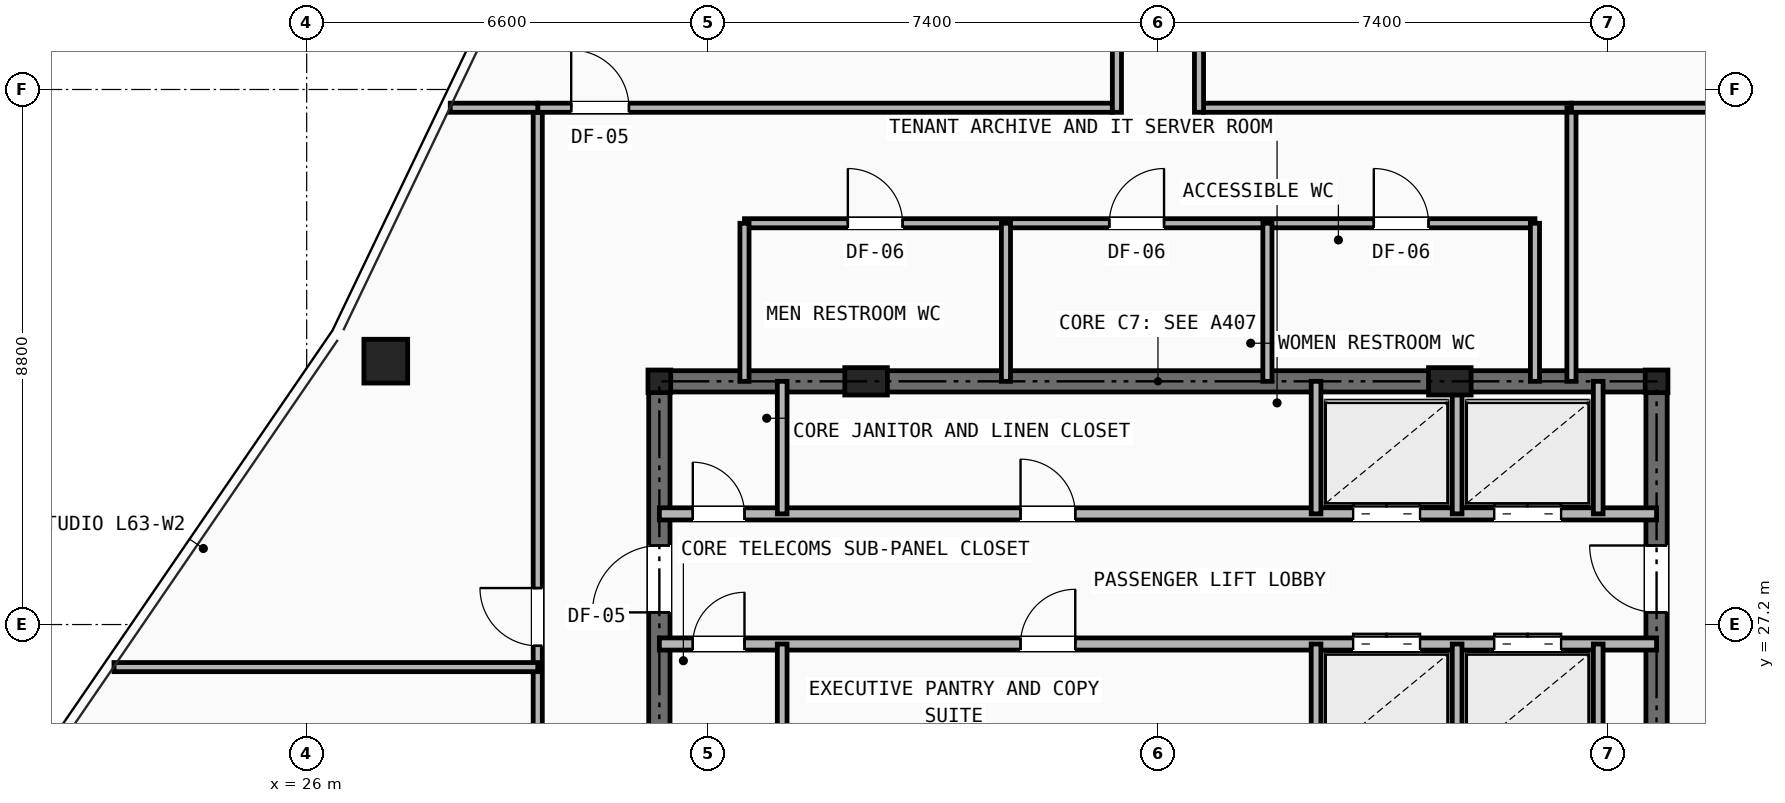
"""IFC4 building model, lengths in metres.
Left out: names, types, materials, properties, quantities, classifications, styles, units other than length and angle.
Written with IfcOpenShell. Run it as: python <this file> out.ifc"""

import sys

from ifc_helpers import new_model, si_unit, direction, frame, frame_2d, origin, origin_2d, place, context, subcontext, project, spatial, rectangle, hollow_rectangle, i_section, extrude, element, fill, save


model = new_model("IFC4")
c1 = context("Model", 3, precision=1e-05, world=origin(), true_north=direction((0.0, 1.0)))
c2 = subcontext(c1, "Body", "Model", "MODEL_VIEW")
j1 = project(units=[si_unit("LENGTHUNIT", "METRE"), si_unit("PLANEANGLEUNIT", "RADIAN")], contexts=[c1])
p1 = place(None, origin())
s1 = spatial("IfcSite", under=j1, at=p1, CompositionType="ELEMENT")
p2 = place(p1, origin())
s2 = spatial("IfcBuilding", under=s1, at=p2, CompositionType="ELEMENT")
p3 = place(p2, frame((0.0, 0.0, 222.4)))
s3 = spatial("IfcBuildingStorey", under=s2, at=p3, CompositionType="ELEMENT", Elevation=222.4)
for number, where, z_axis, x_axis in (
    (1, (31.8, 31.2, 0.0), (0.0, 0.0, 1.0), (1.0, 0.0, 0.0)),
    (2, (48.2, 31.2, 0.0), (0.0, 0.0, 1.0), (1.0, 0.0, 0.0)),
):
    element("IfcColumn", number, at=place(p3, frame(where, z_axis=z_axis, x_axis=x_axis)), inside=s3, PredefinedType="COLUMN", context=c2, shape_type="SweptSolid", body=[
        extrude(i_section(OverallWidth=0.374, OverallDepth=0.372, WebThickness=0.016, FlangeThickness=0.026, at=origin_2d()), origin(), (0.0, 0.0, 1.0), 3.5),
    ])
for number, where, z_axis, x_axis in (
    (3, (35.2, 31.2, 0.0), (0.0, 0.0, 1.0), (1.0, 0.0, 0.0)),
    (4, (44.8, 31.2, 0.0), (0.0, 0.0, 1.0), (1.0, 0.0, 0.0)),
):
    element("IfcColumn", number, at=place(p3, frame(where, z_axis=z_axis, x_axis=x_axis)), inside=s3, PredefinedType="PILASTER", context=c2, shape_type="SweptSolid", body=[
        extrude(rectangle(XDim=0.7, YDim=0.45, at=origin_2d()), origin(), (0.0, 0.0, 1.0), 3.5),
    ])
p4 = place(p3, frame((27.301, 31.532, 0.0), z_axis=(0.0, 0.0, 1.0), x_axis=(1.0, 0.0, 0.0)))
e5 = element("IfcColumn", 5, at=p4, inside=s3, PredefinedType="COLUMN", context=c2, shape_type="SweptSolid", body=[
    extrude(hollow_rectangle(XDim=0.72, YDim=0.72, WallThickness=0.05, at=origin_2d()), origin(), (0.0, 0.0, 1.0), 3.5),
])
p5 = place(p3, frame((31.8, 31.2, 0.0), z_axis=(0.0, 0.0, 1.0), x_axis=(1.0, 0.0, 0.0)))
e6 = element("IfcWall", 6, at=p5, inside=s3, PredefinedType="SHEAR", context=c2, shape_type="SweptSolid", body=[
    extrude(rectangle(XDim=16.4, YDim=0.35, at=frame_2d((8.2, 0.0))), origin(), (0.0, 0.0, 1.0), 3.25),
])
p6 = place(p3, frame((31.8, 16.4, 0.0), z_axis=(0.0, 0.0, 1.0), x_axis=(0.0, 1.0, 0.0)))
e7 = element("IfcWall", 7, at=p6, inside=s3, PredefinedType="SHEAR", context=c2, shape_type="SweptSolid", body=[
    extrude(rectangle(XDim=14.8, YDim=0.35, at=frame_2d((7.4, 0.0))), origin(), (0.0, 0.0, 1.0), 3.25),
])
p7 = place(p6, frame((11.0, 0.0, 0.0)))
e8 = element("IfcOpeningElement", 8, at=p7, cuts=e7, PredefinedType="OPENING", context=c2, shape_type="SweptSolid", body=[
    extrude(rectangle(XDim=1.1, YDim=2.15, at=frame_2d((0.55, 1.075))), frame((0.0, 0.185, 0.0), z_axis=(0.0, -1.0, 0.0), x_axis=(1.0, 0.0, 0.0)), (0.0, 0.0, 1.0), 0.37),
])
p8 = place(p3, frame((48.2, 16.4, 0.0), z_axis=(0.0, 0.0, 1.0), x_axis=(0.0, 1.0, 0.0)))
e9 = element("IfcWall", 9, at=p8, inside=s3, PredefinedType="SHEAR", context=c2, shape_type="SweptSolid", body=[
    extrude(rectangle(XDim=14.8, YDim=0.35, at=frame_2d((7.4, 0.0))), origin(), (0.0, 0.0, 1.0), 3.25),
])
p9 = place(p8, frame((11.0, 0.0, 0.0)))
e10 = element("IfcOpeningElement", 10, at=p9, cuts=e9, PredefinedType="OPENING", context=c2, shape_type="SweptSolid", body=[
    extrude(rectangle(XDim=1.1, YDim=2.15, at=frame_2d((0.55, 1.075))), frame((0.0, 0.185, 0.0), z_axis=(0.0, -1.0, 0.0), x_axis=(1.0, 0.0, 0.0)), (0.0, 0.0, 1.0), 0.37),
])
p10 = place(p3, frame((31.8, 29.02, 0.0), z_axis=(0.0, 0.0, 1.0), x_axis=(1.0, 0.0, 0.0)))
e11 = element("IfcWall", 11, at=p10, inside=s3, PredefinedType="SOLIDWALL", context=c2, shape_type="SweptSolid", body=[
    extrude(rectangle(XDim=16.4, YDim=0.2, at=frame_2d((8.2, 0.0))), origin(), (0.0, 0.0, 1.0), 2.705),
])
p11 = place(p10, frame((0.55, 0.0, 0.0)))
e12 = element("IfcOpeningElement", 12, at=p11, cuts=e11, PredefinedType="OPENING", context=c2, shape_type="SweptSolid", body=[
    extrude(rectangle(XDim=0.85, YDim=2.05, at=frame_2d((0.425, 1.025))), frame((0.0, 0.11, 0.0), z_axis=(0.0, -1.0, 0.0), x_axis=(1.0, 0.0, 0.0)), (0.0, 0.0, 1.0), 0.22),
])
p12 = place(p10, frame((5.94, 0.0, 0.0)))
e13 = element("IfcOpeningElement", 13, at=p12, cuts=e11, PredefinedType="OPENING", context=c2, shape_type="SweptSolid", body=[
    extrude(rectangle(XDim=0.9, YDim=2.1, at=frame_2d((0.45, 1.05))), frame((0.0, 0.11, 0.0), z_axis=(0.0, -1.0, 0.0), x_axis=(1.0, 0.0, 0.0)), (0.0, 0.0, 1.0), 0.22),
])
p13 = place(p10, frame((11.41, 0.0, 0.0)))
e14 = element("IfcOpeningElement", 14, at=p13, cuts=e11, PredefinedType="OPENING", context=c2, shape_type="SweptSolid", body=[
    extrude(rectangle(XDim=1.1, YDim=2.15, at=frame_2d((0.55, 1.075))), frame((0.0, 0.11, 0.0), z_axis=(0.0, -1.0, 0.0), x_axis=(1.0, 0.0, 0.0)), (0.0, 0.0, 1.0), 0.22),
])
p14 = place(p10, frame((13.73, 0.0, 0.0)))
e15 = element("IfcOpeningElement", 15, at=p14, cuts=e11, PredefinedType="OPENING", context=c2, shape_type="SweptSolid", body=[
    extrude(rectangle(XDim=1.1, YDim=2.15, at=frame_2d((0.55, 1.075))), frame((0.0, 0.11, 0.0), z_axis=(0.0, -1.0, 0.0), x_axis=(1.0, 0.0, 0.0)), (0.0, 0.0, 1.0), 0.22),
])
p15 = place(p3, frame((31.8, 26.88, 0.0), z_axis=(0.0, 0.0, 1.0), x_axis=(1.0, 0.0, 0.0)))
e16 = element("IfcWall", 16, at=p15, inside=s3, PredefinedType="SOLIDWALL", context=c2, shape_type="SweptSolid", body=[
    extrude(rectangle(XDim=16.4, YDim=0.2, at=frame_2d((8.2, 0.0))), origin(), (0.0, 0.0, 1.0), 2.705),
])
p16 = place(p15, frame((0.55, 0.0, 0.0)))
e17 = element("IfcOpeningElement", 17, at=p16, cuts=e16, PredefinedType="OPENING", context=c2, shape_type="SweptSolid", body=[
    extrude(rectangle(XDim=0.85, YDim=2.05, at=frame_2d((0.425, 1.025))), frame((0.0, 0.11, 0.0), z_axis=(0.0, -1.0, 0.0), x_axis=(1.0, 0.0, 0.0)), (0.0, 0.0, 1.0), 0.22),
])
p17 = place(p15, frame((5.94, 0.0, 0.0)))
e18 = element("IfcOpeningElement", 18, at=p17, cuts=e16, PredefinedType="OPENING", context=c2, shape_type="SweptSolid", body=[
    extrude(rectangle(XDim=0.9, YDim=2.1, at=frame_2d((0.45, 1.05))), frame((0.0, 0.11, 0.0), z_axis=(0.0, -1.0, 0.0), x_axis=(1.0, 0.0, 0.0)), (0.0, 0.0, 1.0), 0.22),
])
p18 = place(p15, frame((11.41, 0.0, 0.0)))
e19 = element("IfcOpeningElement", 19, at=p18, cuts=e16, PredefinedType="OPENING", context=c2, shape_type="SweptSolid", body=[
    extrude(rectangle(XDim=1.1, YDim=2.15, at=frame_2d((0.55, 1.075))), frame((0.0, 0.11, 0.0), z_axis=(0.0, -1.0, 0.0), x_axis=(1.0, 0.0, 0.0)), (0.0, 0.0, 1.0), 0.22),
])
p19 = place(p15, frame((13.73, 0.0, 0.0)))
e20 = element("IfcOpeningElement", 20, at=p19, cuts=e16, PredefinedType="OPENING", context=c2, shape_type="SweptSolid", body=[
    extrude(rectangle(XDim=1.1, YDim=2.15, at=frame_2d((0.55, 1.075))), frame((0.0, 0.11, 0.0), z_axis=(0.0, -1.0, 0.0), x_axis=(1.0, 0.0, 0.0)), (0.0, 0.0, 1.0), 0.22),
])
p20 = place(p3, frame((33.82, 29.02, 0.0), z_axis=(0.0, 0.0, 1.0), x_axis=(0.0, 1.0, 0.0)))
e21 = element("IfcWall", 21, at=p20, inside=s3, PredefinedType="SOLIDWALL", context=c2, shape_type="SweptSolid", body=[
    extrude(rectangle(XDim=2.18, YDim=0.16, at=frame_2d((1.09, 0.0))), origin(), (0.0, 0.0, 1.0), 2.705),
])
p21 = place(p3, frame((33.82, 24.8, 0.0), z_axis=(0.0, 0.0, 1.0), x_axis=(0.0, 1.0, 0.0)))
e22 = element("IfcWall", 22, at=p21, inside=s3, PredefinedType="SOLIDWALL", context=c2, shape_type="SweptSolid", body=[
    extrude(rectangle(XDim=2.08, YDim=0.16, at=frame_2d((1.04, 0.0))), origin(), (0.0, 0.0, 1.0), 3.25),
])
for number, where, z_axis, x_axis in (
    (23, (42.6, 29.02, 0.0), (0.0, 0.0, 1.0), (0.0, 1.0, 0.0)),
    (24, (44.92, 29.02, 0.0), (0.0, 0.0, 1.0), (0.0, 1.0, 0.0)),
    (25, (47.24, 29.02, 0.0), (0.0, 0.0, 1.0), (0.0, 1.0, 0.0)),
):
    element("IfcWall", number, at=place(p3, frame(where, z_axis=z_axis, x_axis=x_axis)), inside=s3, PredefinedType="SOLIDWALL", context=c2, shape_type="SweptSolid", body=[
        extrude(rectangle(XDim=2.18, YDim=0.16, at=frame_2d((1.09, 0.0))), origin(), (0.0, 0.0, 1.0), 2.705),
    ])
for number, where, z_axis, x_axis in (
    (26, (42.6, 24.8, 0.0), (0.0, 0.0, 1.0), (0.0, 1.0, 0.0)),
    (27, (44.92, 24.8, 0.0), (0.0, 0.0, 1.0), (0.0, 1.0, 0.0)),
    (28, (47.24, 24.8, 0.0), (0.0, 0.0, 1.0), (0.0, 1.0, 0.0)),
):
    element("IfcWall", number, at=place(p3, frame(where, z_axis=z_axis, x_axis=x_axis)), inside=s3, PredefinedType="SOLIDWALL", context=c2, shape_type="SweptSolid", body=[
        extrude(rectangle(XDim=2.08, YDim=0.16, at=frame_2d((1.04, 0.0))), origin(), (0.0, 0.0, 1.0), 3.25),
    ])
p22 = place(p3, frame((33.2, 33.8, 0.0), z_axis=(0.0, 0.0, 1.0), x_axis=(1.0, 0.0, 0.0)))
e29 = element("IfcWall", 29, at=p22, inside=s3, PredefinedType="PARTITIONING", context=c2, shape_type="SweptSolid", body=[
    extrude(rectangle(XDim=13.0, YDim=0.15, at=frame_2d((6.5, 0.0))), origin(), (0.0, 0.0, 1.0), 3.25),
])
p23 = place(p22, frame((1.7, 0.0, 0.0)))
e30 = element("IfcOpeningElement", 30, at=p23, cuts=e29, PredefinedType="OPENING", context=c2, shape_type="SweptSolid", body=[
    extrude(rectangle(XDim=0.9, YDim=2.1, at=frame_2d((0.45, 1.05))), frame((0.0, 0.085, 0.0), z_axis=(0.0, -1.0, 0.0), x_axis=(1.0, 0.0, 0.0)), (0.0, 0.0, 1.0), 0.17),
])
p24 = place(p22, frame((6.0, 0.0, 0.0)))
e31 = element("IfcOpeningElement", 31, at=p24, cuts=e29, PredefinedType="OPENING", context=c2, shape_type="SweptSolid", body=[
    extrude(rectangle(XDim=0.9, YDim=2.1, at=frame_2d((0.45, 1.05))), frame((0.0, 0.085, 0.0), z_axis=(0.0, -1.0, 0.0), x_axis=(1.0, 0.0, 0.0)), (0.0, 0.0, 1.0), 0.17),
])
p25 = place(p22, frame((10.35, 0.0, 0.0)))
e32 = element("IfcOpeningElement", 32, at=p25, cuts=e29, PredefinedType="OPENING", context=c2, shape_type="SweptSolid", body=[
    extrude(rectangle(XDim=0.9, YDim=2.1, at=frame_2d((0.45, 1.05))), frame((0.0, 0.085, 0.0), z_axis=(0.0, -1.0, 0.0), x_axis=(1.0, 0.0, 0.0)), (0.0, 0.0, 1.0), 0.17),
])
for number, where, z_axis, x_axis in (
    (33, (33.2, 31.2, 0.0), (0.0, 0.0, 1.0), (0.0, 1.0, 0.0)),
    (34, (46.2, 31.2, 0.0), (0.0, 0.0, 1.0), (0.0, 1.0, 0.0)),
    (35, (37.5, 31.2, 0.0), (0.0, 0.0, 1.0), (0.0, 1.0, 0.0)),
    (36, (41.8, 31.2, 0.0), (0.0, 0.0, 1.0), (0.0, 1.0, 0.0)),
):
    element("IfcWall", number, at=place(p3, frame(where, z_axis=z_axis, x_axis=x_axis)), inside=s3, PredefinedType="PARTITIONING", context=c2, shape_type="SweptSolid", body=[
        extrude(rectangle(XDim=2.6, YDim=0.15, at=frame_2d((1.3, 0.0))), origin(), (0.0, 0.0, 1.0), 2.705),
    ])
p26 = place(p3, frame((29.8, 16.4, 0.0), z_axis=(0.0, 0.0, 1.0), x_axis=(0.0, 1.0, 0.0)))
e37 = element("IfcWall", 37, at=p26, inside=s3, PredefinedType="PARTITIONING", context=c2, shape_type="SweptSolid", body=[
    extrude(rectangle(XDim=19.3, YDim=0.15, at=frame_2d((9.65, 0.0))), origin(), (0.0, 0.0, 1.0), 2.265),
])
p27 = place(p26, frame((0.35, 0.0, 0.0)))
e38 = element("IfcOpeningElement", 38, at=p27, cuts=e37, PredefinedType="OPENING", context=c2, shape_type="SweptSolid", body=[
    extrude(rectangle(XDim=0.95, YDim=2.1, at=frame_2d((0.475, 1.05))), frame((0.0, 0.085, 0.0), z_axis=(0.0, -1.0, 0.0), x_axis=(1.0, 0.0, 0.0)), (0.0, 0.0, 1.0), 0.17),
])
p28 = place(p26, frame((10.45, 0.0, 0.0)))
e39 = element("IfcOpeningElement", 39, at=p28, cuts=e37, PredefinedType="OPENING", context=c2, shape_type="SweptSolid", body=[
    extrude(rectangle(XDim=0.95, YDim=2.1, at=frame_2d((0.475, 1.05))), frame((0.0, 0.085, 0.0), z_axis=(0.0, -1.0, 0.0), x_axis=(1.0, 0.0, 0.0)), (0.0, 0.0, 1.0), 0.17),
])
p29 = place(p3, frame((29.8, 35.7, 0.0), z_axis=(0.0, 0.0, 1.0), x_axis=(1.0, 0.0, 0.0)))
e40 = element("IfcWall", 40, at=p29, inside=s3, PredefinedType="PARTITIONING", context=c2, shape_type="SweptSolid", body=[
    extrude(rectangle(XDim=9.45, YDim=0.15, at=frame_2d((4.725, 0.0))), origin(), (0.0, 0.0, 1.0), 2.833),
])
p30 = place(p29, frame((0.55, 0.0, 0.0)))
e41 = element("IfcOpeningElement", 41, at=p30, cuts=e40, PredefinedType="OPENING", context=c2, shape_type="SweptSolid", body=[
    extrude(rectangle(XDim=0.95, YDim=2.1, at=frame_2d((0.475, 1.05))), frame((0.0, 0.085, 0.0), z_axis=(0.0, -1.0, 0.0), x_axis=(1.0, 0.0, 0.0)), (0.0, 0.0, 1.0), 0.17),
])
p31 = place(p3, frame((40.75, 35.7, 0.0), z_axis=(0.0, 0.0, 1.0), x_axis=(1.0, 0.0, 0.0)))
e42 = element("IfcWall", 42, at=p31, inside=s3, PredefinedType="PARTITIONING", context=c2, shape_type="SweptSolid", body=[
    extrude(rectangle(XDim=6.05, YDim=0.15, at=frame_2d((3.025, 0.0))), origin(), (0.0, 0.0, 1.0), 3.25),
])
p32 = place(p3, frame((46.8, 31.2, 0.0), z_axis=(0.0, 0.0, 1.0), x_axis=(0.0, 1.0, 0.0)))
e43 = element("IfcWall", 43, at=p32, inside=s3, PredefinedType="PARTITIONING", context=c2, shape_type="SweptSolid", body=[
    extrude(rectangle(XDim=4.5, YDim=0.15, at=frame_2d((2.25, 0.0))), origin(), (0.0, 0.0, 1.0), 2.705),
])
p33 = place(p3, frame((28.361, 35.7, 0.0), z_axis=(0.0, 0.0, 1.0), x_axis=(1.0, 0.0, 0.0)))
e44 = element("IfcWall", 44, at=p33, inside=s3, PredefinedType="PARTITIONING", context=c2, shape_type="SweptSolid", body=[
    extrude(rectangle(XDim=1.439, YDim=0.15, at=frame_2d((0.719, 0.0))), origin(), (0.0, 0.0, 1.0), 2.628),
])
p34 = place(p3, frame((22.831, 26.5, 0.0), z_axis=(0.0, 0.0, 1.0), x_axis=(1.0, 0.0, 0.0)))
e45 = element("IfcWall", 45, at=p34, inside=s3, PredefinedType="PARTITIONING", context=c2, shape_type="SweptSolid", body=[
    extrude(rectangle(XDim=6.969, YDim=0.15, at=frame_2d((3.484, 0.0))), origin(), (0.0, 0.0, 1.0), 2.628),
])
p35 = place(p3, frame((46.8, 35.7, 0.0), z_axis=(0.0, 0.0, 1.0), x_axis=(1.0, 0.0, 0.0)))
e46 = element("IfcWall", 46, at=p35, inside=s3, PredefinedType="PARTITIONING", context=c2, shape_type="SweptSolid", body=[
    extrude(rectangle(XDim=4.839, YDim=0.15, at=frame_2d((2.419, 0.0))), origin(), (0.0, 0.0, 1.0), 2.628),
])
for number, where, z_axis, x_axis in (
    (47, (39.325, 35.625, 0.0), (0.0, 0.0, 1.0), (0.0, 1.0, 0.0)),
    (48, (40.675, 35.625, 0.0), (0.0, 0.0, 1.0), (0.0, 1.0, 0.0)),
):
    element("IfcWall", number, at=place(p3, frame(where, z_axis=z_axis, x_axis=x_axis)), inside=s3, PredefinedType="PARTITIONING", context=c2, shape_type="SweptSolid", body=[
        extrude(rectangle(XDim=2.825, YDim=0.15, at=frame_2d((1.413, 0.0))), origin(), (0.0, 0.0, 1.0), 3.25),
    ])
p36 = place(p11, origin())
e49 = element("IfcDoor", 49, at=p36, inside=s3, OperationType="SINGLE_SWING_LEFT", PredefinedType="DOOR", context=c2, shape_type="SweptSolid", body=[
    extrude(rectangle(XDim=0.85, YDim=2.05, at=frame_2d((0.425, 1.025))), frame((0.0, 0.025, 0.0), z_axis=(0.0, -1.0, 0.0), x_axis=(1.0, 0.0, 0.0)), (0.0, 0.0, 1.0), 0.05),
])
fill(e12, e49)
p37 = place(p16, origin())
e50 = element("IfcDoor", 50, at=p37, inside=s3, OperationType="SINGLE_SWING_RIGHT", PredefinedType="DOOR", context=c2, shape_type="SweptSolid", body=[
    extrude(rectangle(XDim=0.85, YDim=2.05, at=frame_2d((0.425, 1.025))), frame((0.0, 0.025, 0.0), z_axis=(0.0, -1.0, 0.0), x_axis=(1.0, 0.0, 0.0)), (0.0, 0.0, 1.0), 0.05),
])
fill(e17, e50)
p38 = place(p7, origin())
e51 = element("IfcDoor", 51, at=p38, inside=s3, OperationType="SINGLE_SWING_LEFT", PredefinedType="DOOR", context=c2, shape_type="SweptSolid", body=[
    extrude(rectangle(XDim=1.1, YDim=2.15, at=frame_2d((0.55, 1.075))), frame((0.0, 0.025, 0.0), z_axis=(0.0, -1.0, 0.0), x_axis=(1.0, 0.0, 0.0)), (0.0, 0.0, 1.0), 0.05),
])
fill(e8, e51)
p39 = place(p9, origin())
e52 = element("IfcDoor", 52, at=p39, inside=s3, OperationType="SINGLE_SWING_RIGHT", PredefinedType="DOOR", context=c2, shape_type="SweptSolid", body=[
    extrude(rectangle(XDim=1.1, YDim=2.15, at=frame_2d((0.55, 1.075))), frame((0.0, 0.025, 0.0), z_axis=(0.0, -1.0, 0.0), x_axis=(1.0, 0.0, 0.0)), (0.0, 0.0, 1.0), 0.05),
])
fill(e10, e52)
p40 = place(p12, origin())
e53 = element("IfcDoor", 53, at=p40, inside=s3, OperationType="SINGLE_SWING_LEFT", PredefinedType="DOOR", context=c2, shape_type="SweptSolid", body=[
    extrude(rectangle(XDim=0.9, YDim=2.1, at=frame_2d((0.45, 1.05))), frame((0.0, 0.025, 0.0), z_axis=(0.0, -1.0, 0.0), x_axis=(1.0, 0.0, 0.0)), (0.0, 0.0, 1.0), 0.05),
])
fill(e13, e53)
p41 = place(p17, origin())
e54 = element("IfcDoor", 54, at=p41, inside=s3, OperationType="SINGLE_SWING_RIGHT", PredefinedType="DOOR", context=c2, shape_type="SweptSolid", body=[
    extrude(rectangle(XDim=0.9, YDim=2.1, at=frame_2d((0.45, 1.05))), frame((0.0, 0.025, 0.0), z_axis=(0.0, -1.0, 0.0), x_axis=(1.0, 0.0, 0.0)), (0.0, 0.0, 1.0), 0.05),
])
fill(e18, e54)
p42 = place(p13, origin())
e55 = element("IfcDoor", 55, at=p42, inside=s3, OperationType="DOUBLE_DOOR_SLIDING", PredefinedType="DOOR", context=c2, shape_type="SweptSolid", body=[
    extrude(rectangle(XDim=1.1, YDim=2.15, at=frame_2d((0.55, 1.075))), frame((0.0, 0.025, 0.0), z_axis=(0.0, -1.0, 0.0), x_axis=(1.0, 0.0, 0.0)), (0.0, 0.0, 1.0), 0.05),
])
fill(e14, e55)
p43 = place(p14, origin())
e56 = element("IfcDoor", 56, at=p43, inside=s3, OperationType="DOUBLE_DOOR_SLIDING", PredefinedType="DOOR", context=c2, shape_type="SweptSolid", body=[
    extrude(rectangle(XDim=1.1, YDim=2.15, at=frame_2d((0.55, 1.075))), frame((0.0, 0.025, 0.0), z_axis=(0.0, -1.0, 0.0), x_axis=(1.0, 0.0, 0.0)), (0.0, 0.0, 1.0), 0.05),
])
fill(e15, e56)
p44 = place(p18, origin())
e57 = element("IfcDoor", 57, at=p44, inside=s3, OperationType="DOUBLE_DOOR_SLIDING", PredefinedType="DOOR", context=c2, shape_type="SweptSolid", body=[
    extrude(rectangle(XDim=1.1, YDim=2.15, at=frame_2d((0.55, 1.075))), frame((0.0, 0.025, 0.0), z_axis=(0.0, -1.0, 0.0), x_axis=(1.0, 0.0, 0.0)), (0.0, 0.0, 1.0), 0.05),
])
fill(e19, e57)
p45 = place(p19, origin())
e58 = element("IfcDoor", 58, at=p45, inside=s3, OperationType="DOUBLE_DOOR_SLIDING", PredefinedType="DOOR", context=c2, shape_type="SweptSolid", body=[
    extrude(rectangle(XDim=1.1, YDim=2.15, at=frame_2d((0.55, 1.075))), frame((0.0, 0.025, 0.0), z_axis=(0.0, -1.0, 0.0), x_axis=(1.0, 0.0, 0.0)), (0.0, 0.0, 1.0), 0.05),
])
fill(e20, e58)
p46 = place(p23, origin())
e59 = element("IfcDoor", 59, at=p46, inside=s3, OperationType="SINGLE_SWING_LEFT", PredefinedType="DOOR", context=c2, shape_type="SweptSolid", body=[
    extrude(rectangle(XDim=0.9, YDim=2.1, at=frame_2d((0.45, 1.05))), frame((0.0, 0.025, 0.0), z_axis=(0.0, -1.0, 0.0), x_axis=(1.0, 0.0, 0.0)), (0.0, 0.0, 1.0), 0.05),
])
fill(e30, e59)
p47 = place(p24, origin())
e60 = element("IfcDoor", 60, at=p47, inside=s3, OperationType="SINGLE_SWING_RIGHT", PredefinedType="DOOR", context=c2, shape_type="SweptSolid", body=[
    extrude(rectangle(XDim=0.9, YDim=2.1, at=frame_2d((0.45, 1.05))), frame((0.0, 0.025, 0.0), z_axis=(0.0, -1.0, 0.0), x_axis=(1.0, 0.0, 0.0)), (0.0, 0.0, 1.0), 0.05),
])
fill(e31, e60)
p48 = place(p25, origin())
e61 = element("IfcDoor", 61, at=p48, inside=s3, OperationType="SINGLE_SWING_LEFT", PredefinedType="DOOR", context=c2, shape_type="SweptSolid", body=[
    extrude(rectangle(XDim=0.9, YDim=2.1, at=frame_2d((0.45, 1.05))), frame((0.0, 0.025, 0.0), z_axis=(0.0, -1.0, 0.0), x_axis=(1.0, 0.0, 0.0)), (0.0, 0.0, 1.0), 0.05),
])
fill(e32, e61)
p49 = place(p28, origin())
e62 = element("IfcDoor", 62, at=p49, inside=s3, OperationType="SINGLE_SWING_RIGHT", PredefinedType="DOOR", context=c2, shape_type="SweptSolid", body=[
    extrude(rectangle(XDim=0.95, YDim=2.1, at=frame_2d((0.475, 1.05))), frame((0.0, 0.025, 0.0), z_axis=(0.0, -1.0, 0.0), x_axis=(1.0, 0.0, 0.0)), (0.0, 0.0, 1.0), 0.05),
])
fill(e39, e62)
p50 = place(p30, origin())
e63 = element("IfcDoor", 63, at=p50, inside=s3, OperationType="SINGLE_SWING_LEFT", PredefinedType="DOOR", context=c2, shape_type="SweptSolid", body=[
    extrude(rectangle(XDim=0.95, YDim=2.1, at=frame_2d((0.475, 1.05))), frame((0.0, 0.025, 0.0), z_axis=(0.0, -1.0, 0.0), x_axis=(1.0, 0.0, 0.0)), (0.0, 0.0, 1.0), 0.05),
])
fill(e41, e63)
save(model, sys.argv[1])
